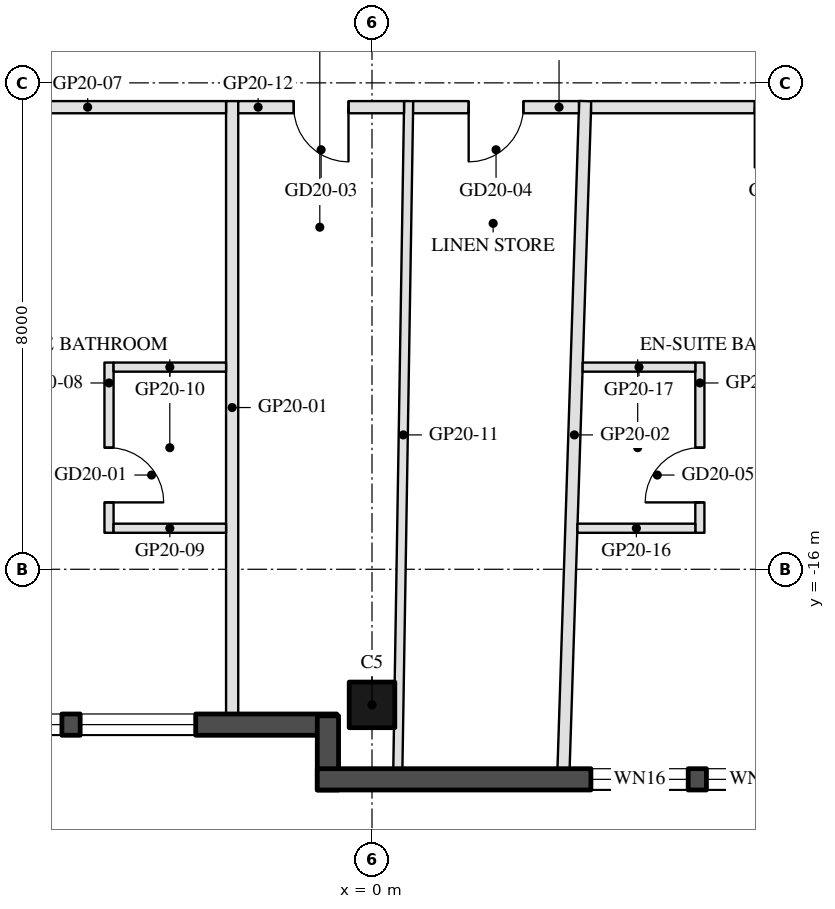
"""IFC4 building model, lengths in metres.
Left out: names, types, materials, properties, quantities, classifications, styles, units other than length and angle.
Written with IfcOpenShell. Run it as: python <this file> out.ifc"""

import sys

from ifc_helpers import new_model, si_unit, direction, frame, frame_2d, origin, origin_2d, place, context, subcontext, project, spatial, rectangle, hollow_rectangle, extrude, element, fill, save


model = new_model("IFC4")
c1 = context("Model", 3, precision=1e-05, world=origin(), true_north=direction((0.0, 1.0)))
c2 = subcontext(c1, "Body", "Model", "MODEL_VIEW")
j1 = project(units=[si_unit("LENGTHUNIT", "METRE"), si_unit("PLANEANGLEUNIT", "RADIAN")], contexts=[c1])
p1 = place(None, origin())
s1 = spatial("IfcSite", under=j1, at=p1, CompositionType="ELEMENT")
p2 = place(p1, origin())
s2 = spatial("IfcBuilding", under=s1, at=p2, CompositionType="ELEMENT")
p3 = place(p2, frame((0.0, 0.0, 213.2)))
s3 = spatial("IfcBuildingStorey", under=s2, at=p3, CompositionType="ELEMENT", Elevation=213.2)
p4 = place(p3, frame((0.0, -18.23, 0.0), z_axis=(0.0, 0.0, 1.0), x_axis=(-1.0, 0.0, 0.0)))
e1 = element("IfcColumn", 1, at=p4, inside=s3, PredefinedType="COLUMN", context=c2, shape_type="SweptSolid", body=[
    extrude(hollow_rectangle(XDim=0.75, YDim=0.75, WallThickness=0.035, at=origin_2d()), origin(), (0.0, 0.0, 1.0), 3.7),
])
p5 = place(p3, frame((-7.32, -18.555, 0.0), z_axis=(0.0, 0.0, 1.0), x_axis=(1.0, 0.0, 0.0)))
e2 = element("IfcWall", 2, at=p5, inside=s3, PredefinedType="SOLIDWALL", context=c2, shape_type="SweptSolid", body=[
    extrude(rectangle(XDim=6.74, YDim=0.35, at=frame_2d((3.37, 0.0))), origin(), (0.0, 0.0, 1.0), 3.55),
])
p6 = place(p5, frame((0.32, 0.0, 0.3)))
e3 = element("IfcOpeningElement", 3, at=p6, cuts=e2, PredefinedType="OPENING", context=c2, shape_type="SweptSolid", body=[
    extrude(rectangle(XDim=1.9, YDim=2.65, at=frame_2d((0.95, 1.325))), frame((0.0, 0.185, 0.0), z_axis=(0.0, -1.0, 0.0), x_axis=(1.0, 0.0, 0.0)), (0.0, 0.0, 1.0), 0.37),
])
p7 = place(p5, frame((2.521, 0.0, 0.3)))
e4 = element("IfcOpeningElement", 4, at=p7, cuts=e2, PredefinedType="OPENING", context=c2, shape_type="SweptSolid", body=[
    extrude(rectangle(XDim=1.9, YDim=2.65, at=frame_2d((0.95, 1.325))), frame((0.0, 0.185, 0.0), z_axis=(0.0, -1.0, 0.0), x_axis=(1.0, 0.0, 0.0)), (0.0, 0.0, 1.0), 0.37),
])
p8 = place(p3, frame((-0.725, -18.41, 0.0), z_axis=(0.0, 0.0, 1.0), x_axis=(0.0, -1.0, 0.0)))
e5 = element("IfcWall", 5, at=p8, inside=s3, PredefinedType="SOLIDWALL", context=c2, shape_type="SweptSolid", body=[
    extrude(rectangle(XDim=1.22, YDim=0.35, at=frame_2d((0.61, 0.0))), origin(), (0.0, 0.0, 1.0), 3.55),
])
p9 = place(p3, frame((-0.9, -19.455, 0.0), z_axis=(0.0, 0.0, 1.0), x_axis=(1.0, 0.0, 0.0)))
e6 = element("IfcWall", 6, at=p9, inside=s3, PredefinedType="SOLIDWALL", context=c2, shape_type="SweptSolid", body=[
    extrude(rectangle(XDim=9.7, YDim=0.35, at=frame_2d((4.85, 0.0))), origin(), (0.0, 0.0, 1.0), 3.55),
])
p10 = place(p9, frame((4.5, 0.0, 0.3)))
e7 = element("IfcOpeningElement", 7, at=p10, cuts=e6, PredefinedType="OPENING", context=c2, shape_type="SweptSolid", body=[
    extrude(rectangle(XDim=1.6, YDim=2.65, at=frame_2d((0.8, 1.325))), frame((0.0, 0.185, 0.0), z_axis=(0.0, -1.0, 0.0), x_axis=(1.0, 0.0, 0.0)), (0.0, 0.0, 1.0), 0.37),
])
p11 = place(p9, frame((6.4, 0.0, 0.3)))
e8 = element("IfcOpeningElement", 8, at=p11, cuts=e6, PredefinedType="OPENING", context=c2, shape_type="SweptSolid", body=[
    extrude(rectangle(XDim=1.6, YDim=2.65, at=frame_2d((0.8, 1.325))), frame((0.0, 0.185, 0.0), z_axis=(0.0, -1.0, 0.0), x_axis=(1.0, 0.0, 0.0)), (0.0, 0.0, 1.0), 0.37),
])
p12 = place(p3, frame((-2.3, -18.38, 0.0), z_axis=(0.0, 0.0, 1.0), x_axis=(0.0, 1.0, 0.0)))
e9 = element("IfcWall", 9, at=p12, inside=s3, PredefinedType="PARTITIONING", context=c2, shape_type="SweptSolid", body=[
    extrude(rectangle(XDim=10.08, YDim=0.2, at=frame_2d((5.04, 0.0))), origin(), (0.0, 0.0, 1.0), 3.06),
])
p13 = place(p3, frame((3.15, -19.28, 0.0), z_axis=(0.0, 0.0, 1.0), x_axis=(0.032468308586, 0.999472765481, 0.0)))
e10 = element("IfcWall", 10, at=p13, inside=s3, PredefinedType="PARTITIONING", context=c2, shape_type="SweptSolid", body=[
    extrude(rectangle(XDim=10.986, YDim=0.2, at=frame_2d((5.493, 0.0))), origin(), (0.0, 0.0, 1.0), 3.06),
])
p14 = place(p3, frame((-2.4, -8.4, 0.0), z_axis=(0.0, 0.0, 1.0), x_axis=(-1.0, 0.0, 0.0)))
e11 = element("IfcWall", 11, at=p14, inside=s3, PredefinedType="PARTITIONING", context=c2, shape_type="SweptSolid", body=[
    extrude(rectangle(XDim=7.588, YDim=0.2, at=frame_2d((3.794, 0.0))), origin(), (0.0, 0.0, 1.0), 2.95),
])
p15 = place(p14, frame((3.294, 0.0, 0.0)))
e12 = element("IfcOpeningElement", 12, at=p15, cuts=e11, PredefinedType="OPENING", context=c2, shape_type="SweptSolid", body=[
    extrude(rectangle(XDim=1.0, YDim=2.1, at=frame_2d((0.5, 1.05))), frame((0.0, 0.11, 0.0), z_axis=(0.0, -1.0, 0.0), x_axis=(1.0, 0.0, 0.0)), (0.0, 0.0, 1.0), 0.22),
])
p16 = place(p3, frame((-4.325, -12.6, 0.0), z_axis=(0.0, 0.0, 1.0), x_axis=(0.0, -1.0, 0.0)))
e13 = element("IfcWall", 13, at=p16, inside=s3, PredefinedType="PARTITIONING", context=c2, shape_type="SweptSolid", body=[
    extrude(rectangle(XDim=2.8, YDim=0.15, at=frame_2d((1.4, 0.0))), origin(), (0.0, 0.0, 1.0), 3.55),
])
p17 = place(p16, frame((1.4, 0.0, 0.0)))
e14 = element("IfcOpeningElement", 14, at=p17, cuts=e13, PredefinedType="OPENING", context=c2, shape_type="SweptSolid", body=[
    extrude(rectangle(XDim=0.9, YDim=2.1, at=frame_2d((0.45, 1.05))), frame((0.0, 0.085, 0.0), z_axis=(0.0, -1.0, 0.0), x_axis=(1.0, 0.0, 0.0)), (0.0, 0.0, 1.0), 0.17),
])
for number, where, z_axis, x_axis in (
    (15, (-4.25, -15.325, 0.0), (0.0, 0.0, 1.0), (1.0, 0.0, 0.0)),
    (16, (-4.25, -12.675, 0.0), (0.0, 0.0, 1.0), (1.0, 0.0, 0.0)),
):
    element("IfcWall", number, at=place(p3, frame(where, z_axis=z_axis, x_axis=x_axis)), inside=s3, PredefinedType="PARTITIONING", context=c2, shape_type="SweptSolid", body=[
        extrude(rectangle(XDim=1.85, YDim=0.15, at=frame_2d((0.925, 0.0))), origin(), (0.0, 0.0, 1.0), 2.95),
    ])
p18 = place(p3, frame((0.425, -19.28, 0.0), z_axis=(0.0, 0.0, 1.0), x_axis=(0.016229462675, 0.999868293597, 0.0)))
e17 = element("IfcWall", 17, at=p18, inside=s3, PredefinedType="PARTITIONING", context=c2, shape_type="SweptSolid", body=[
    extrude(rectangle(XDim=10.981, YDim=0.15, at=frame_2d((5.491, 0.0))), origin(), (0.0, 0.0, 1.0), 3.06),
])
p19 = place(p3, frame((0.527, -8.4, 0.0), z_axis=(0.0, 0.0, 1.0), x_axis=(-1.0, 0.0, 0.0)))
e18 = element("IfcWall", 18, at=p19, inside=s3, PredefinedType="PARTITIONING", context=c2, shape_type="SweptSolid", body=[
    extrude(rectangle(XDim=2.727, YDim=0.2, at=frame_2d((1.363, 0.0))), origin(), (0.0, 0.0, 1.0), 2.95),
])
p20 = place(p19, frame((0.913, 0.0, 0.0)))
e19 = element("IfcOpeningElement", 19, at=p20, cuts=e18, PredefinedType="OPENING", context=c2, shape_type="SweptSolid", body=[
    extrude(rectangle(XDim=0.9, YDim=2.1, at=frame_2d((0.45, 1.05))), frame((0.0, 0.11, 0.0), z_axis=(0.0, -1.0, 0.0), x_axis=(1.0, 0.0, 0.0)), (0.0, 0.0, 1.0), 0.22),
])
p21 = place(p3, frame((3.403, -8.4, 0.0), z_axis=(0.0, 0.0, 1.0), x_axis=(-1.0, 0.0, 0.0)))
e20 = element("IfcWall", 20, at=p21, inside=s3, PredefinedType="PARTITIONING", context=c2, shape_type="SweptSolid", body=[
    extrude(rectangle(XDim=2.727, YDim=0.2, at=frame_2d((1.363, 0.0))), origin(), (0.0, 0.0, 1.0), 3.55),
])
p22 = place(p21, frame((0.913, 0.0, 0.0)))
e21 = element("IfcOpeningElement", 21, at=p22, cuts=e20, PredefinedType="OPENING", context=c2, shape_type="SweptSolid", body=[
    extrude(rectangle(XDim=0.9, YDim=2.1, at=frame_2d((0.45, 1.05))), frame((0.0, 0.11, 0.0), z_axis=(0.0, -1.0, 0.0), x_axis=(1.0, 0.0, 0.0)), (0.0, 0.0, 1.0), 0.22),
])
p23 = place(p3, frame((9.988, -8.4, 0.0), z_axis=(0.0, 0.0, 1.0), x_axis=(-1.0, 0.0, 0.0)))
e22 = element("IfcWall", 22, at=p23, inside=s3, PredefinedType="PARTITIONING", context=c2, shape_type="SweptSolid", body=[
    extrude(rectangle(XDim=6.385, YDim=0.2, at=frame_2d((3.192, 0.0))), origin(), (0.0, 0.0, 1.0), 2.95),
])
p24 = place(p23, frame((2.692, 0.0, 0.0)))
e23 = element("IfcOpeningElement", 23, at=p24, cuts=e22, PredefinedType="OPENING", context=c2, shape_type="SweptSolid", body=[
    extrude(rectangle(XDim=1.0, YDim=2.1, at=frame_2d((0.5, 1.05))), frame((0.0, 0.11, 0.0), z_axis=(0.0, -1.0, 0.0), x_axis=(1.0, 0.0, 0.0)), (0.0, 0.0, 1.0), 0.22),
])
p25 = place(p3, frame((5.392, -15.4, 0.0), z_axis=(0.0, 0.0, 1.0), x_axis=(0.0, 1.0, 0.0)))
e24 = element("IfcWall", 24, at=p25, inside=s3, PredefinedType="PARTITIONING", context=c2, shape_type="SweptSolid", body=[
    extrude(rectangle(XDim=2.8, YDim=0.15, at=frame_2d((1.4, 0.0))), origin(), (0.0, 0.0, 1.0), 3.55),
])
p26 = place(p25, frame((0.5, 0.0, 0.0)))
e25 = element("IfcOpeningElement", 25, at=p26, cuts=e24, PredefinedType="OPENING", context=c2, shape_type="SweptSolid", body=[
    extrude(rectangle(XDim=0.9, YDim=2.1, at=frame_2d((0.45, 1.05))), frame((0.0, 0.085, 0.0), z_axis=(0.0, -1.0, 0.0), x_axis=(1.0, 0.0, 0.0)), (0.0, 0.0, 1.0), 0.17),
])
p27 = place(p3, frame((3.378, -15.325, 0.0), z_axis=(0.0, 0.0, 1.0), x_axis=(1.0, 0.0, 0.0)))
e26 = element("IfcWall", 26, at=p27, inside=s3, PredefinedType="PARTITIONING", context=c2, shape_type="SweptSolid", body=[
    extrude(rectangle(XDim=1.938, YDim=0.15, at=frame_2d((0.969, 0.0))), origin(), (0.0, 0.0, 1.0), 2.95),
])
p28 = place(p3, frame((3.465, -12.675, 0.0), z_axis=(0.0, 0.0, 1.0), x_axis=(1.0, 0.0, 0.0)))
e27 = element("IfcWall", 27, at=p28, inside=s3, PredefinedType="PARTITIONING", context=c2, shape_type="SweptSolid", body=[
    extrude(rectangle(XDim=1.852, YDim=0.15, at=frame_2d((0.926, 0.0))), origin(), (0.0, 0.0, 1.0), 2.95),
])
p29 = place(p6, origin())
e28 = element("IfcWindow", 28, at=p29, inside=s3, PartitioningType="SINGLE_PANEL", PredefinedType="WINDOW", context=c2, shape_type="SweptSolid", body=[
    extrude(rectangle(XDim=1.9, YDim=2.65, at=frame_2d((0.95, 1.325))), frame((0.0, 0.03, 0.0), z_axis=(0.0, -1.0, 0.0), x_axis=(1.0, 0.0, 0.0)), (0.0, 0.0, 1.0), 0.06),
])
fill(e3, e28)
p30 = place(p7, origin())
e29 = element("IfcWindow", 29, at=p30, inside=s3, PartitioningType="SINGLE_PANEL", PredefinedType="WINDOW", context=c2, shape_type="SweptSolid", body=[
    extrude(rectangle(XDim=1.9, YDim=2.65, at=frame_2d((0.95, 1.325))), frame((0.0, 0.03, 0.0), z_axis=(0.0, -1.0, 0.0), x_axis=(1.0, 0.0, 0.0)), (0.0, 0.0, 1.0), 0.06),
])
fill(e4, e29)
p31 = place(p10, origin())
e30 = element("IfcWindow", 30, at=p31, inside=s3, PartitioningType="SINGLE_PANEL", PredefinedType="WINDOW", context=c2, shape_type="SweptSolid", body=[
    extrude(rectangle(XDim=1.6, YDim=2.65, at=frame_2d((0.8, 1.325))), frame((0.0, 0.03, 0.0), z_axis=(0.0, -1.0, 0.0), x_axis=(1.0, 0.0, 0.0)), (0.0, 0.0, 1.0), 0.06),
])
fill(e7, e30)
p32 = place(p11, origin())
e31 = element("IfcWindow", 31, at=p32, inside=s3, PartitioningType="SINGLE_PANEL", PredefinedType="WINDOW", context=c2, shape_type="SweptSolid", body=[
    extrude(rectangle(XDim=1.6, YDim=2.65, at=frame_2d((0.8, 1.325))), frame((0.0, 0.03, 0.0), z_axis=(0.0, -1.0, 0.0), x_axis=(1.0, 0.0, 0.0)), (0.0, 0.0, 1.0), 0.06),
])
fill(e8, e31)
p33 = place(p17, origin())
e32 = element("IfcDoor", 32, at=p33, inside=s3, OperationType="SINGLE_SWING_RIGHT", PredefinedType="DOOR", context=c2, shape_type="SweptSolid", body=[
    extrude(rectangle(XDim=0.9, YDim=2.1, at=frame_2d((0.45, 1.05))), frame((0.0, 0.025, 0.0), z_axis=(0.0, -1.0, 0.0), x_axis=(1.0, 0.0, 0.0)), (0.0, 0.0, 1.0), 0.05),
])
fill(e14, e32)
p34 = place(p20, origin())
e33 = element("IfcDoor", 33, at=p34, inside=s3, OperationType="SINGLE_SWING_LEFT", PredefinedType="DOOR", context=c2, shape_type="SweptSolid", body=[
    extrude(rectangle(XDim=0.9, YDim=2.1, at=frame_2d((0.45, 1.05))), frame((0.0, 0.025, 0.0), z_axis=(0.0, -1.0, 0.0), x_axis=(1.0, 0.0, 0.0)), (0.0, 0.0, 1.0), 0.05),
])
fill(e19, e33)
p35 = place(p22, origin())
e34 = element("IfcDoor", 34, at=p35, inside=s3, OperationType="SINGLE_SWING_RIGHT", PredefinedType="DOOR", context=c2, shape_type="SweptSolid", body=[
    extrude(rectangle(XDim=0.9, YDim=2.1, at=frame_2d((0.45, 1.05))), frame((0.0, 0.025, 0.0), z_axis=(0.0, -1.0, 0.0), x_axis=(1.0, 0.0, 0.0)), (0.0, 0.0, 1.0), 0.05),
])
fill(e21, e34)
p36 = place(p26, origin())
e35 = element("IfcDoor", 35, at=p36, inside=s3, OperationType="SINGLE_SWING_LEFT", PredefinedType="DOOR", context=c2, shape_type="SweptSolid", body=[
    extrude(rectangle(XDim=0.9, YDim=2.1, at=frame_2d((0.45, 1.05))), frame((0.0, 0.025, 0.0), z_axis=(0.0, -1.0, 0.0), x_axis=(1.0, 0.0, 0.0)), (0.0, 0.0, 1.0), 0.05),
])
fill(e25, e35)
p37 = place(p24, origin())
e36 = element("IfcDoor", 36, at=p37, inside=s3, OperationType="SINGLE_SWING_RIGHT", PredefinedType="DOOR", context=c2, shape_type="SweptSolid", body=[
    extrude(rectangle(XDim=1.0, YDim=2.1, at=frame_2d((0.5, 1.05))), frame((0.0, 0.025, 0.0), z_axis=(0.0, -1.0, 0.0), x_axis=(1.0, 0.0, 0.0)), (0.0, 0.0, 1.0), 0.05),
])
fill(e23, e36)
save(model, sys.argv[1])
